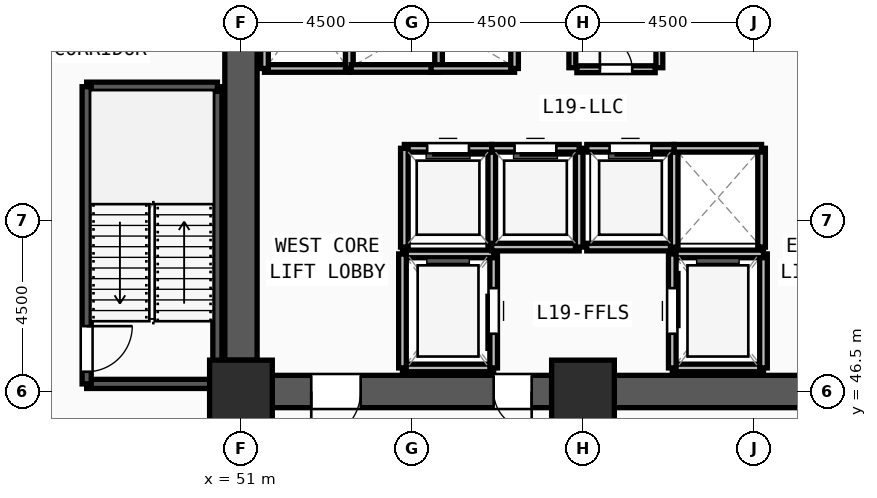
"""IFC4 building model, lengths in metres.
Left out: names, types, materials, properties, quantities, classifications, styles, units other than length and angle.
Written with IfcOpenShell. Run it as: python <this file> out.ifc"""

import sys

from ifc_helpers import new_model, si_unit, direction, frame, frame_2d, origin, origin_2d, place, context, subcontext, project, spatial, rectangle, extrude, source, transform, mapped, element, fill, save


model = new_model("IFC4")
c1 = context("Model", 3, precision=1e-05, world=origin(), true_north=direction((0.0, 1.0)))
c2 = subcontext(c1, "Body", "Model", "MODEL_VIEW")
j1 = project(units=[si_unit("LENGTHUNIT", "METRE"), si_unit("PLANEANGLEUNIT", "RADIAN")], contexts=[c1])
p1 = place(None, origin())
s1 = spatial("IfcSite", under=j1, at=p1, CompositionType="ELEMENT")
p2 = place(p1, origin())
s2 = spatial("IfcBuilding", under=s1, at=p2, CompositionType="ELEMENT")
p3 = place(p2, frame((0.0, 0.0, 74.25)))
s3 = spatial("IfcBuildingStorey", under=s2, at=p3, CompositionType="ELEMENT", Elevation=74.25)
m1 = source(origin(), c2, "Body", "SweptSolid", [
    extrude(rectangle(XDim=1.65, YDim=1.65, at=origin_2d()), origin(), (0.0, 0.0, 1.0), 3.75),
])
for number, where, z_axis, x_axis in (
    (1, (51.0, 46.5, 0.0), (0.0, 0.0, 1.0), (1.0, 0.0, 0.0)),
    (2, (60.0, 46.5, 0.0), (0.0, 0.0, 1.0), (1.0, 0.0, 0.0)),
):
    element("IfcColumn", number, at=place(p3, frame(where, z_axis=z_axis, x_axis=x_axis)), inside=s3, PredefinedType="COLUMN", context=c2, shape_type="MappedRepresentation", body=[
        mapped(m1, transform((0.0, 0.0, 0.0), x_axis=(1.0, 0.0, 0.0), y_axis=(0.0, 1.0, 0.0), z_axis=(0.0, 0.0, 1.0), scale=1.0)),
    ])
p4 = place(p3, frame((68.175, 46.5, 0.0), z_axis=(0.0, 0.0, 1.0), x_axis=(-1.0, 0.0, 0.0)))
e3 = element("IfcWall", 3, at=p4, inside=s3, PredefinedType="SHEAR", context=c2, shape_type="SweptSolid", body=[
    extrude(rectangle(XDim=7.35, YDim=0.85, at=frame_2d((3.675, 0.0))), origin(), (0.0, 0.0, 1.0), 3.57),
])
m2 = source(origin(), c2, "Body", "SweptSolid", [
    extrude(rectangle(XDim=1.3, YDim=2.2, at=frame_2d((0.65, 1.1))), frame((0.0, 0.435, 0.0), z_axis=(0.0, -1.0, 0.0), x_axis=(1.0, 0.0, 0.0)), (0.0, 0.0, 1.0), 0.87),
])
p5 = place(p4, frame((1.025, 0.0, 0.0)))
e4 = element("IfcOpeningElement", 4, at=p5, cuts=e3, PredefinedType="OPENING", context=c2, shape_type="MappedRepresentation", body=[
    mapped(m2, transform((0.0, 0.0, 0.0), x_axis=(1.0, 0.0, 0.0), y_axis=(0.0, 1.0, 0.0), z_axis=(0.0, 0.0, 1.0), scale=1.0)),
])
p6 = place(p3, frame((59.175, 46.5, 0.0), z_axis=(0.0, 0.0, 1.0), x_axis=(-1.0, 0.0, 0.0)))
e5 = element("IfcWall", 5, at=p6, inside=s3, PredefinedType="SHEAR", context=c2, shape_type="SweptSolid", body=[
    extrude(rectangle(XDim=7.35, YDim=0.85, at=frame_2d((3.675, 0.0))), origin(), (0.0, 0.0, 1.0), 3.57),
])
p7 = place(p6, frame((5.025, 0.0, 0.0)))
e6 = element("IfcOpeningElement", 6, at=p7, cuts=e5, PredefinedType="OPENING", context=c2, shape_type="MappedRepresentation", body=[
    mapped(m2, transform((0.0, 0.0, 0.0), x_axis=(1.0, 0.0, 0.0), y_axis=(0.0, 1.0, 0.0), z_axis=(0.0, 0.0, 1.0), scale=1.0)),
])
m3 = source(origin(), c2, "Body", "SweptSolid", [
    extrude(rectangle(XDim=1.0, YDim=2.2, at=frame_2d((0.5, 1.1))), frame((0.0, 0.435, 0.0), z_axis=(0.0, -1.0, 0.0), x_axis=(1.0, 0.0, 0.0)), (0.0, 0.0, 1.0), 0.87),
])
p8 = place(p6, frame((0.525, 0.0, 0.0)))
e7 = element("IfcOpeningElement", 7, at=p8, cuts=e5, PredefinedType="OPENING", context=c2, shape_type="MappedRepresentation", body=[
    mapped(m3, transform((0.0, 0.0, 0.0), x_axis=(1.0, 0.0, 0.0), y_axis=(0.0, 1.0, 0.0), z_axis=(0.0, 0.0, 1.0), scale=1.0)),
])
p9 = place(p3, frame((51.0, 47.325, 0.0), z_axis=(0.0, 0.0, 1.0), x_axis=(0.0, 1.0, 0.0)))
e8 = element("IfcWall", 8, at=p9, inside=s3, PredefinedType="SHEAR", context=c2, shape_type="SweptSolid", body=[
    extrude(rectangle(XDim=13.35, YDim=0.85, at=frame_2d((6.675, 0.0))), origin(), (0.0, 0.0, 1.0), 3.57),
])
p10 = place(p3, frame((46.94, 46.7, 0.0), z_axis=(0.0, 0.0, 1.0), x_axis=(1.0, 0.0, 0.0)))
e9 = element("IfcWall", 9, at=p10, inside=s3, PredefinedType="SOLIDWALL", context=c2, shape_type="SweptSolid", body=[
    extrude(rectangle(XDim=3.44, YDim=0.24, at=frame_2d((1.72, 0.0))), origin(), (0.0, 0.0, 1.0), 3.57),
])
p11 = place(p3, frame((50.38, 46.7, 0.0), z_axis=(0.0, 0.0, 1.0), x_axis=(0.0, 1.0, 0.0)))
e10 = element("IfcWall", 10, at=p11, inside=s3, PredefinedType="SOLIDWALL", context=c2, shape_type="SweptSolid", body=[
    extrude(rectangle(XDim=7.82, YDim=0.24, at=frame_2d((3.91, 0.0))), origin(), (0.0, 0.0, 1.0), 3.57),
])
p12 = place(p3, frame((50.38, 54.52, 0.0), z_axis=(0.0, 0.0, 1.0), x_axis=(-1.0, 0.0, 0.0)))
e11 = element("IfcWall", 11, at=p12, inside=s3, PredefinedType="SOLIDWALL", context=c2, shape_type="SweptSolid", body=[
    extrude(rectangle(XDim=3.44, YDim=0.24, at=frame_2d((1.72, 0.0))), origin(), (0.0, 0.0, 1.0), 3.57),
])
p13 = place(p3, frame((46.94, 54.52, 0.0), z_axis=(0.0, 0.0, 1.0), x_axis=(0.0, -1.0, 0.0)))
e12 = element("IfcWall", 12, at=p13, inside=s3, PredefinedType="SOLIDWALL", context=c2, shape_type="SweptSolid", body=[
    extrude(rectangle(XDim=7.82, YDim=0.24, at=frame_2d((3.91, 0.0))), origin(), (0.0, 0.0, 1.0), 3.57),
])
m4 = source(origin(), c2, "Body", "SweptSolid", [
    extrude(rectangle(XDim=1.2, YDim=2.2, at=frame_2d((0.6, 1.1))), frame((0.0, 0.13, 0.0), z_axis=(0.0, -1.0, 0.0), x_axis=(1.0, 0.0, 0.0)), (0.0, 0.0, 1.0), 0.26),
])
p14 = place(p13, frame((6.3, 0.0, 0.0)))
e13 = element("IfcOpeningElement", 13, at=p14, cuts=e12, PredefinedType="OPENING", context=c2, shape_type="MappedRepresentation", body=[
    mapped(m4, transform((0.0, 0.0, 0.0), x_axis=(1.0, 0.0, 0.0), y_axis=(0.0, 1.0, 0.0), z_axis=(0.0, 0.0, 1.0), scale=1.0)),
])
p15 = place(p3, frame((55.25, 47.12, 0.0), z_axis=(0.0, 0.0, 1.0), x_axis=(1.0, 0.0, 0.0)))
e14 = element("IfcWall", 14, at=p15, inside=s3, PredefinedType="SOLIDWALL", context=c2, shape_type="SweptSolid", body=[
    extrude(rectangle(XDim=2.4, YDim=0.2, at=frame_2d((1.2, 0.0))), origin(), (0.0, 0.0, 1.0), 3.57),
])
p16 = place(p3, frame((57.65, 47.12, 0.0), z_axis=(0.0, 0.0, 1.0), x_axis=(0.0, 1.0, 0.0)))
e15 = element("IfcWall", 15, at=p16, inside=s3, PredefinedType="SOLIDWALL", context=c2, shape_type="SweptSolid", body=[
    extrude(rectangle(XDim=3.0, YDim=0.2, at=frame_2d((1.5, 0.0))), origin(), (0.0, 0.0, 1.0), 3.57),
])
m5 = source(origin(), c2, "Body", "SweptSolid", [
    extrude(rectangle(XDim=1.2, YDim=2.3, at=frame_2d((0.6, 1.15))), frame((0.0, 0.11, 0.0), z_axis=(0.0, -1.0, 0.0), x_axis=(1.0, 0.0, 0.0)), (0.0, 0.0, 1.0), 0.22),
])
p17 = place(p16, frame((0.9, 0.0, 0.0)))
e16 = element("IfcOpeningElement", 16, at=p17, cuts=e15, PredefinedType="OPENING", context=c2, shape_type="MappedRepresentation", body=[
    mapped(m5, transform((0.0, 0.0, 0.0), x_axis=(1.0, 0.0, 0.0), y_axis=(0.0, 1.0, 0.0), z_axis=(0.0, 0.0, 1.0), scale=1.0)),
])
p18 = place(p3, frame((57.65, 50.12, 0.0), z_axis=(0.0, 0.0, 1.0), x_axis=(-1.0, 0.0, 0.0)))
e17 = element("IfcWall", 17, at=p18, inside=s3, PredefinedType="SOLIDWALL", context=c2, shape_type="SweptSolid", body=[
    extrude(rectangle(XDim=2.4, YDim=0.2, at=frame_2d((1.2, 0.0))), origin(), (0.0, 0.0, 1.0), 3.57),
])
p19 = place(p3, frame((55.25, 50.12, 0.0), z_axis=(0.0, 0.0, 1.0), x_axis=(0.0, -1.0, 0.0)))
e18 = element("IfcWall", 18, at=p19, inside=s3, PredefinedType="SOLIDWALL", context=c2, shape_type="SweptSolid", body=[
    extrude(rectangle(XDim=3.0, YDim=0.2, at=frame_2d((1.5, 0.0))), origin(), (0.0, 0.0, 1.0), 3.57),
])
p20 = place(p3, frame((62.35, 47.12, 0.0), z_axis=(0.0, 0.0, 1.0), x_axis=(1.0, 0.0, 0.0)))
e19 = element("IfcWall", 19, at=p20, inside=s3, PredefinedType="SOLIDWALL", context=c2, shape_type="SweptSolid", body=[
    extrude(rectangle(XDim=2.4, YDim=0.2, at=frame_2d((1.2, 0.0))), origin(), (0.0, 0.0, 1.0), 3.57),
])
p21 = place(p3, frame((64.75, 47.12, 0.0), z_axis=(0.0, 0.0, 1.0), x_axis=(0.0, 1.0, 0.0)))
e20 = element("IfcWall", 20, at=p21, inside=s3, PredefinedType="SOLIDWALL", context=c2, shape_type="SweptSolid", body=[
    extrude(rectangle(XDim=3.0, YDim=0.2, at=frame_2d((1.5, 0.0))), origin(), (0.0, 0.0, 1.0), 3.57),
])
p22 = place(p3, frame((64.75, 50.12, 0.0), z_axis=(0.0, 0.0, 1.0), x_axis=(-1.0, 0.0, 0.0)))
e21 = element("IfcWall", 21, at=p22, inside=s3, PredefinedType="SOLIDWALL", context=c2, shape_type="SweptSolid", body=[
    extrude(rectangle(XDim=2.4, YDim=0.2, at=frame_2d((1.2, 0.0))), origin(), (0.0, 0.0, 1.0), 3.57),
])
p23 = place(p3, frame((62.35, 50.12, 0.0), z_axis=(0.0, 0.0, 1.0), x_axis=(0.0, -1.0, 0.0)))
e22 = element("IfcWall", 22, at=p23, inside=s3, PredefinedType="SOLIDWALL", context=c2, shape_type="SweptSolid", body=[
    extrude(rectangle(XDim=3.0, YDim=0.2, at=frame_2d((1.5, 0.0))), origin(), (0.0, 0.0, 1.0), 3.57),
])
p24 = place(p23, frame((0.9, 0.0, 0.0)))
e23 = element("IfcOpeningElement", 23, at=p24, cuts=e22, PredefinedType="OPENING", context=c2, shape_type="MappedRepresentation", body=[
    mapped(m5, transform((0.0, 0.0, 0.0), x_axis=(1.0, 0.0, 0.0), y_axis=(0.0, 1.0, 0.0), z_axis=(0.0, 0.0, 1.0), scale=1.0)),
])
p25 = place(p3, frame((51.62, 55.0, 0.0), z_axis=(0.0, 0.0, 1.0), x_axis=(1.0, 0.0, 0.0)))
e24 = element("IfcWall", 24, at=p25, inside=s3, PredefinedType="SOLIDWALL", context=c2, shape_type="SweptSolid", body=[
    extrude(rectangle(XDim=2.23, YDim=0.2, at=frame_2d((1.115, 0.0))), origin(), (0.0, 0.0, 1.0), 3.57),
])
for number, where, z_axis, x_axis in (
    (25, (53.85, 55.0, 0.0), (0.0, 0.0, 1.0), (0.0, 1.0, 0.0)),
    (26, (51.62, 58.0, 0.0), (0.0, 0.0, 1.0), (0.0, -1.0, 0.0)),
):
    element("IfcWall", number, at=place(p3, frame(where, z_axis=z_axis, x_axis=x_axis)), inside=s3, PredefinedType="SOLIDWALL", context=c2, shape_type="SweptSolid", body=[
        extrude(rectangle(XDim=3.0, YDim=0.2, at=frame_2d((1.5, 0.0))), origin(), (0.0, 0.0, 1.0), 3.57),
    ])
p26 = place(p3, frame((57.6, 50.3, 0.0), z_axis=(0.0, 0.0, 1.0), x_axis=(0.0, 1.0, 0.0)))
e27 = element("IfcWall", 27, at=p26, inside=s3, PredefinedType="SOLIDWALL", context=c2, shape_type="SweptSolid", body=[
    extrude(rectangle(XDim=2.6, YDim=0.2, at=frame_2d((1.3, 0.0))), origin(), (0.0, 0.0, 1.0), 3.57),
])
p27 = place(p3, frame((57.6, 52.9, 0.0), z_axis=(0.0, 0.0, 1.0), x_axis=(-1.0, 0.0, 0.0)))
e28 = element("IfcWall", 28, at=p27, inside=s3, PredefinedType="SOLIDWALL", context=c2, shape_type="SweptSolid", body=[
    extrude(rectangle(XDim=2.3, YDim=0.2, at=frame_2d((1.15, 0.0))), origin(), (0.0, 0.0, 1.0), 3.57),
])
m6 = source(origin(), c2, "Body", "SweptSolid", [
    extrude(rectangle(XDim=1.1, YDim=2.2, at=frame_2d((0.55, 1.1))), frame((0.0, 0.11, 0.0), z_axis=(0.0, -1.0, 0.0), x_axis=(1.0, 0.0, 0.0)), (0.0, 0.0, 1.0), 0.22),
])
p28 = place(p27, frame((0.6, 0.0, 0.0)))
e29 = element("IfcOpeningElement", 29, at=p28, cuts=e28, PredefinedType="OPENING", context=c2, shape_type="MappedRepresentation", body=[
    mapped(m6, transform((0.0, 0.0, 0.0), x_axis=(1.0, 0.0, 0.0), y_axis=(0.0, 1.0, 0.0), z_axis=(0.0, 0.0, 1.0), scale=1.0)),
])
p29 = place(p3, frame((55.3, 52.9, 0.0), z_axis=(0.0, 0.0, 1.0), x_axis=(0.0, -1.0, 0.0)))
e30 = element("IfcWall", 30, at=p29, inside=s3, PredefinedType="SOLIDWALL", context=c2, shape_type="SweptSolid", body=[
    extrude(rectangle(XDim=2.6, YDim=0.2, at=frame_2d((1.3, 0.0))), origin(), (0.0, 0.0, 1.0), 3.57),
])
p30 = place(p3, frame((57.6, 50.3, 0.0), z_axis=(0.0, 0.0, 1.0), x_axis=(1.0, 0.0, 0.0)))
e31 = element("IfcWall", 31, at=p30, inside=s3, PredefinedType="SOLIDWALL", context=c2, shape_type="SweptSolid", body=[
    extrude(rectangle(XDim=2.3, YDim=0.2, at=frame_2d((1.15, 0.0))), origin(), (0.0, 0.0, 1.0), 3.57),
])
p31 = place(p3, frame((59.9, 50.3, 0.0), z_axis=(0.0, 0.0, 1.0), x_axis=(0.0, 1.0, 0.0)))
e32 = element("IfcWall", 32, at=p31, inside=s3, PredefinedType="SOLIDWALL", context=c2, shape_type="SweptSolid", body=[
    extrude(rectangle(XDim=2.6, YDim=0.2, at=frame_2d((1.3, 0.0))), origin(), (0.0, 0.0, 1.0), 3.57),
])
p32 = place(p3, frame((59.9, 52.9, 0.0), z_axis=(0.0, 0.0, 1.0), x_axis=(-1.0, 0.0, 0.0)))
e33 = element("IfcWall", 33, at=p32, inside=s3, PredefinedType="SOLIDWALL", context=c2, shape_type="SweptSolid", body=[
    extrude(rectangle(XDim=2.3, YDim=0.2, at=frame_2d((1.15, 0.0))), origin(), (0.0, 0.0, 1.0), 3.57),
])
p33 = place(p32, frame((0.6, 0.0, 0.0)))
e34 = element("IfcOpeningElement", 34, at=p33, cuts=e33, PredefinedType="OPENING", context=c2, shape_type="MappedRepresentation", body=[
    mapped(m6, transform((0.0, 0.0, 0.0), x_axis=(1.0, 0.0, 0.0), y_axis=(0.0, 1.0, 0.0), z_axis=(0.0, 0.0, 1.0), scale=1.0)),
])
p34 = place(p3, frame((60.1, 50.3, 0.0), z_axis=(0.0, 0.0, 1.0), x_axis=(1.0, 0.0, 0.0)))
e35 = element("IfcWall", 35, at=p34, inside=s3, PredefinedType="SOLIDWALL", context=c2, shape_type="SweptSolid", body=[
    extrude(rectangle(XDim=2.3, YDim=0.2, at=frame_2d((1.15, 0.0))), origin(), (0.0, 0.0, 1.0), 3.57),
])
p35 = place(p3, frame((62.4, 50.3, 0.0), z_axis=(0.0, 0.0, 1.0), x_axis=(0.0, 1.0, 0.0)))
e36 = element("IfcWall", 36, at=p35, inside=s3, PredefinedType="SOLIDWALL", context=c2, shape_type="SweptSolid", body=[
    extrude(rectangle(XDim=2.6, YDim=0.2, at=frame_2d((1.3, 0.0))), origin(), (0.0, 0.0, 1.0), 3.57),
])
p36 = place(p3, frame((62.4, 52.9, 0.0), z_axis=(0.0, 0.0, 1.0), x_axis=(-1.0, 0.0, 0.0)))
e37 = element("IfcWall", 37, at=p36, inside=s3, PredefinedType="SOLIDWALL", context=c2, shape_type="SweptSolid", body=[
    extrude(rectangle(XDim=2.3, YDim=0.2, at=frame_2d((1.15, 0.0))), origin(), (0.0, 0.0, 1.0), 3.57),
])
p37 = place(p36, frame((0.6, 0.0, 0.0)))
e38 = element("IfcOpeningElement", 38, at=p37, cuts=e37, PredefinedType="OPENING", context=c2, shape_type="MappedRepresentation", body=[
    mapped(m6, transform((0.0, 0.0, 0.0), x_axis=(1.0, 0.0, 0.0), y_axis=(0.0, 1.0, 0.0), z_axis=(0.0, 0.0, 1.0), scale=1.0)),
])
p38 = place(p3, frame((64.7, 50.3, 0.0), z_axis=(0.0, 0.0, 1.0), x_axis=(0.0, 1.0, 0.0)))
e39 = element("IfcWall", 39, at=p38, inside=s3, PredefinedType="SOLIDWALL", context=c2, shape_type="SweptSolid", body=[
    extrude(rectangle(XDim=2.6, YDim=0.2, at=frame_2d((1.3, 0.0))), origin(), (0.0, 0.0, 1.0), 3.57),
])
for number, where, z_axis, x_axis in (
    (40, (64.7, 52.9, 0.0), (0.0, 0.0, 1.0), (-1.0, 0.0, 0.0)),
    (41, (53.9, 55.0, 0.0), (0.0, 0.0, 1.0), (1.0, 0.0, 0.0)),
):
    element("IfcWall", number, at=place(p3, frame(where, z_axis=z_axis, x_axis=x_axis)), inside=s3, PredefinedType="SOLIDWALL", context=c2, shape_type="SweptSolid", body=[
        extrude(rectangle(XDim=2.3, YDim=0.2, at=frame_2d((1.15, 0.0))), origin(), (0.0, 0.0, 1.0), 3.57),
    ])
p39 = place(p3, frame((56.2, 55.0, 0.0), z_axis=(0.0, 0.0, 1.0), x_axis=(0.0, 1.0, 0.0)))
e42 = element("IfcWall", 42, at=p39, inside=s3, PredefinedType="SOLIDWALL", context=c2, shape_type="SweptSolid", body=[
    extrude(rectangle(XDim=2.6, YDim=0.2, at=frame_2d((1.3, 0.0))), origin(), (0.0, 0.0, 1.0), 3.57),
])
p40 = place(p3, frame((56.0, 55.0, 0.0), z_axis=(0.0, 0.0, 1.0), x_axis=(1.0, 0.0, 0.0)))
e43 = element("IfcWall", 43, at=p40, inside=s3, PredefinedType="SOLIDWALL", context=c2, shape_type="SweptSolid", body=[
    extrude(rectangle(XDim=2.2, YDim=0.2, at=frame_2d((1.1, 0.0))), origin(), (0.0, 0.0, 1.0), 3.57),
])
p41 = place(p3, frame((58.2, 55.0, 0.0), z_axis=(0.0, 0.0, 1.0), x_axis=(0.0, 1.0, 0.0)))
e44 = element("IfcWall", 44, at=p41, inside=s3, PredefinedType="SOLIDWALL", context=c2, shape_type="SweptSolid", body=[
    extrude(rectangle(XDim=2.6, YDim=0.2, at=frame_2d((1.3, 0.0))), origin(), (0.0, 0.0, 1.0), 3.57),
])
p42 = place(p3, frame((59.84, 54.98, 0.0), z_axis=(0.0, 0.0, 1.0), x_axis=(1.0, 0.0, 0.0)))
e45 = element("IfcWall", 45, at=p42, inside=s3, PredefinedType="PARTITIONING", context=c2, shape_type="SweptSolid", body=[
    extrude(rectangle(XDim=2.06, YDim=0.18, at=frame_2d((1.03, 0.0))), origin(), (0.0, 0.0, 1.0), 3.57),
])
m7 = source(origin(), c2, "Body", "SweptSolid", [
    extrude(rectangle(XDim=0.85, YDim=2.1, at=frame_2d((0.425, 1.05))), frame((0.0, 0.1, 0.0), z_axis=(0.0, -1.0, 0.0), x_axis=(1.0, 0.0, 0.0)), (0.0, 0.0, 1.0), 0.2),
])
p43 = place(p42, frame((0.605, 0.0, 0.0)))
e46 = element("IfcOpeningElement", 46, at=p43, cuts=e45, PredefinedType="OPENING", context=c2, shape_type="MappedRepresentation", body=[
    mapped(m7, transform((0.0, 0.0, 0.0), x_axis=(1.0, 0.0, 0.0), y_axis=(0.0, 1.0, 0.0), z_axis=(0.0, 0.0, 1.0), scale=1.0)),
])
for number, where, z_axis, x_axis in (
    (47, (59.72, 55.02, 0.0), (0.0, 0.0, 1.0), (0.0, 1.0, 0.0)),
    (48, (62.01, 55.02, 0.0), (0.0, 0.0, 1.0), (0.0, 1.0, 0.0)),
):
    element("IfcWall", number, at=place(p3, frame(where, z_axis=z_axis, x_axis=x_axis)), inside=s3, PredefinedType="PARTITIONING", context=c2, shape_type="SweptSolid", body=[
        extrude(rectangle(XDim=2.88, YDim=0.18, at=frame_2d((1.44, 0.0))), origin(), (0.0, 0.0, 1.0), 3.57),
    ])
m8 = source(origin(), c2, "Body", "SweptSolid", [
    extrude(rectangle(XDim=1.3, YDim=2.2, at=frame_2d((0.65, 1.1))), frame((0.0, 0.025, 0.0), z_axis=(0.0, -1.0, 0.0), x_axis=(1.0, 0.0, 0.0)), (0.0, 0.0, 1.0), 0.05),
])
p44 = place(p7, origin())
e49 = element("IfcDoor", 49, at=p44, inside=s3, OperationType="SINGLE_SWING_RIGHT", PredefinedType="DOOR", context=c2, shape_type="MappedRepresentation", body=[
    mapped(m8, transform((0.0, 0.0, 0.0), x_axis=(1.0, 0.0, 0.0), y_axis=(0.0, 1.0, 0.0), z_axis=(0.0, 0.0, 1.0), scale=1.0)),
])
fill(e6, e49)
m9 = source(origin(), c2, "Body", "SweptSolid", [
    extrude(rectangle(XDim=1.0, YDim=2.2, at=frame_2d((0.5, 1.1))), frame((0.0, 0.025, 0.0), z_axis=(0.0, -1.0, 0.0), x_axis=(1.0, 0.0, 0.0)), (0.0, 0.0, 1.0), 0.05),
])
p45 = place(p8, origin())
e50 = element("IfcDoor", 50, at=p45, inside=s3, OperationType="SINGLE_SWING_LEFT", PredefinedType="DOOR", context=c2, shape_type="MappedRepresentation", body=[
    mapped(m9, transform((0.0, 0.0, 0.0), x_axis=(1.0, 0.0, 0.0), y_axis=(0.0, 1.0, 0.0), z_axis=(0.0, 0.0, 1.0), scale=1.0)),
])
fill(e7, e50)
m10 = source(origin(), c2, "Body", "SweptSolid", [
    extrude(rectangle(XDim=1.2, YDim=2.2, at=frame_2d((0.6, 1.1))), frame((0.0, 0.025, 0.0), z_axis=(0.0, -1.0, 0.0), x_axis=(1.0, 0.0, 0.0)), (0.0, 0.0, 1.0), 0.05),
])
p46 = place(p14, origin())
e51 = element("IfcDoor", 51, at=p46, inside=s3, OperationType="SINGLE_SWING_LEFT", PredefinedType="DOOR", context=c2, shape_type="MappedRepresentation", body=[
    mapped(m10, transform((0.0, 0.0, 0.0), x_axis=(1.0, 0.0, 0.0), y_axis=(0.0, 1.0, 0.0), z_axis=(0.0, 0.0, 1.0), scale=1.0)),
])
fill(e13, e51)
m11 = source(origin(), c2, "Body", "SweptSolid", [
    extrude(rectangle(XDim=1.2, YDim=2.3, at=frame_2d((0.6, 1.15))), frame((0.0, 0.025, 0.0), z_axis=(0.0, -1.0, 0.0), x_axis=(1.0, 0.0, 0.0)), (0.0, 0.0, 1.0), 0.05),
])
p47 = place(p17, origin())
e52 = element("IfcDoor", 52, at=p47, inside=s3, OperationType="SLIDING_TO_LEFT", PredefinedType="DOOR", context=c2, shape_type="MappedRepresentation", body=[
    mapped(m11, transform((0.0, 0.0, 0.0), x_axis=(1.0, 0.0, 0.0), y_axis=(0.0, 1.0, 0.0), z_axis=(0.0, 0.0, 1.0), scale=1.0)),
])
fill(e16, e52)
p48 = place(p24, origin())
e53 = element("IfcDoor", 53, at=p48, inside=s3, OperationType="SLIDING_TO_LEFT", PredefinedType="DOOR", context=c2, shape_type="MappedRepresentation", body=[
    mapped(m11, transform((0.0, 0.0, 0.0), x_axis=(1.0, 0.0, 0.0), y_axis=(0.0, 1.0, 0.0), z_axis=(0.0, 0.0, 1.0), scale=1.0)),
])
fill(e23, e53)
m12 = source(origin(), c2, "Body", "SweptSolid", [
    extrude(rectangle(XDim=1.1, YDim=2.2, at=frame_2d((0.55, 1.1))), frame((0.0, 0.025, 0.0), z_axis=(0.0, -1.0, 0.0), x_axis=(1.0, 0.0, 0.0)), (0.0, 0.0, 1.0), 0.05),
])
p49 = place(p28, origin())
e54 = element("IfcDoor", 54, at=p49, inside=s3, OperationType="SLIDING_TO_LEFT", PredefinedType="DOOR", context=c2, shape_type="MappedRepresentation", body=[
    mapped(m12, transform((0.0, 0.0, 0.0), x_axis=(1.0, 0.0, 0.0), y_axis=(0.0, 1.0, 0.0), z_axis=(0.0, 0.0, 1.0), scale=1.0)),
])
fill(e29, e54)
p50 = place(p33, origin())
e55 = element("IfcDoor", 55, at=p50, inside=s3, OperationType="SLIDING_TO_LEFT", PredefinedType="DOOR", context=c2, shape_type="MappedRepresentation", body=[
    mapped(m12, transform((0.0, 0.0, 0.0), x_axis=(1.0, 0.0, 0.0), y_axis=(0.0, 1.0, 0.0), z_axis=(0.0, 0.0, 1.0), scale=1.0)),
])
fill(e34, e55)
p51 = place(p37, origin())
e56 = element("IfcDoor", 56, at=p51, inside=s3, OperationType="SLIDING_TO_LEFT", PredefinedType="DOOR", context=c2, shape_type="MappedRepresentation", body=[
    mapped(m12, transform((0.0, 0.0, 0.0), x_axis=(1.0, 0.0, 0.0), y_axis=(0.0, 1.0, 0.0), z_axis=(0.0, 0.0, 1.0), scale=1.0)),
])
fill(e38, e56)
m13 = source(origin(), c2, "Body", "SweptSolid", [
    extrude(rectangle(XDim=0.85, YDim=2.1, at=frame_2d((0.425, 1.05))), frame((0.0, 0.025, 0.0), z_axis=(0.0, -1.0, 0.0), x_axis=(1.0, 0.0, 0.0)), (0.0, 0.0, 1.0), 0.05),
])
p52 = place(p43, origin())
e57 = element("IfcDoor", 57, at=p52, inside=s3, OperationType="SINGLE_SWING_LEFT", PredefinedType="DOOR", context=c2, shape_type="MappedRepresentation", body=[
    mapped(m13, transform((0.0, 0.0, 0.0), x_axis=(1.0, 0.0, 0.0), y_axis=(0.0, 1.0, 0.0), z_axis=(0.0, 0.0, 1.0), scale=1.0)),
])
fill(e46, e57)
save(model, sys.argv[1])
